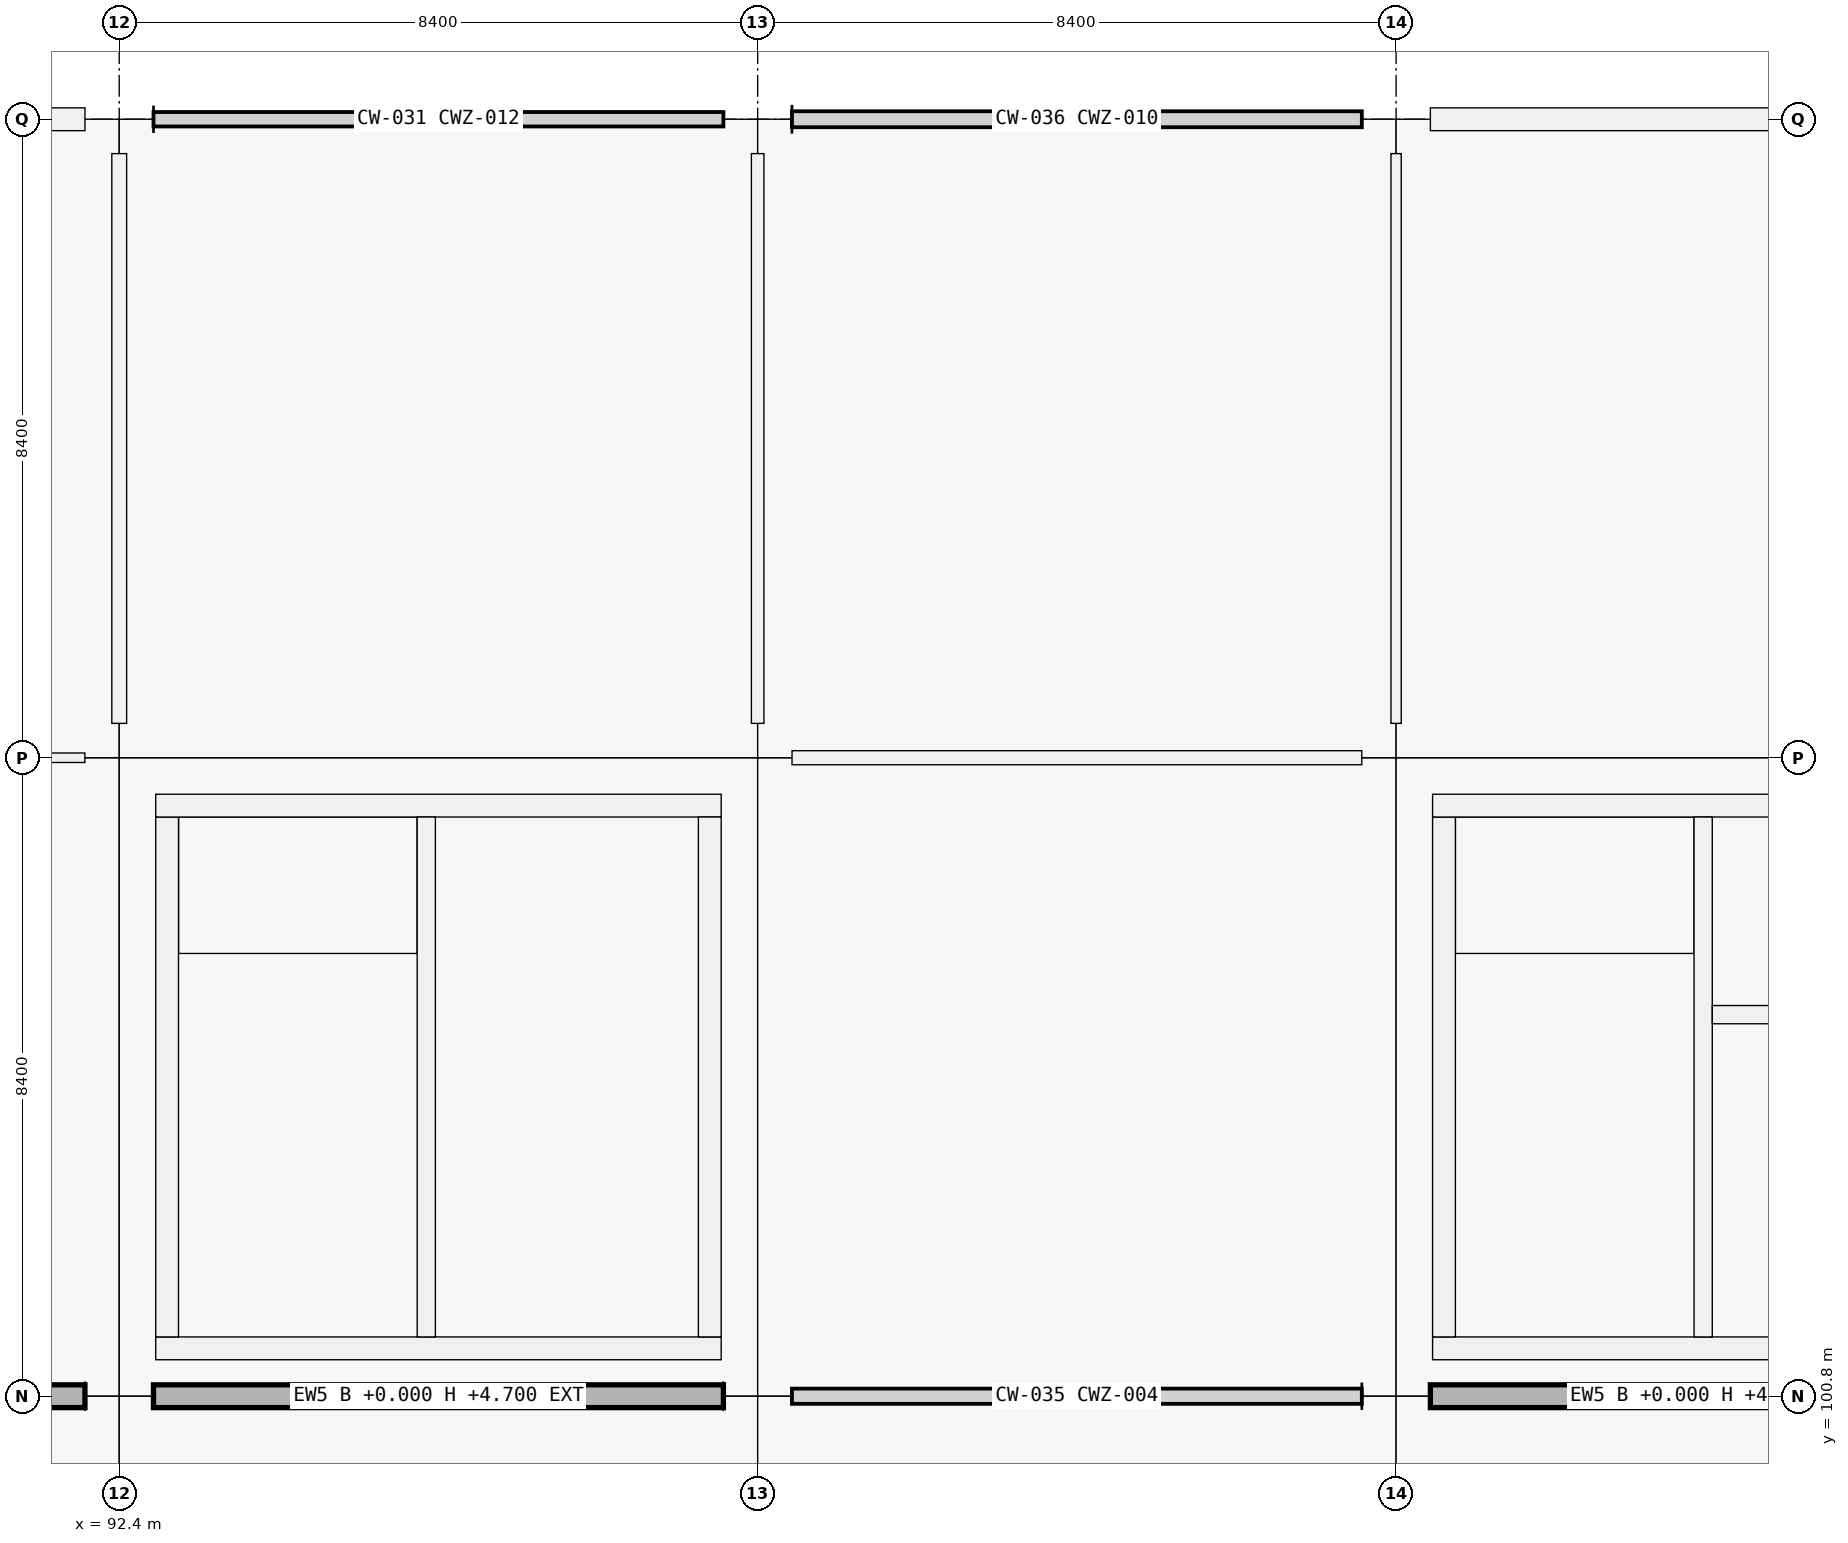
"""IFC4 building model, lengths in metres.
Left out: names, types, materials, properties, quantities, classifications, styles, units other than length and angle.
Written with IfcOpenShell. Run it as: python <this file> out.ifc"""

import sys

from ifc_helpers import new_model, si_unit, direction, frame, frame_2d, origin, origin_2d, place, context, subcontext, project, spatial, rectangle, extrude, element, fill, save


model = new_model("IFC4")
c1 = context("Model", 3, precision=1e-05, world=origin(), true_north=direction((0.0, 1.0)))
c2 = subcontext(c1, "Body", "Model", "MODEL_VIEW")
j1 = project(units=[si_unit("LENGTHUNIT", "METRE"), si_unit("PLANEANGLEUNIT", "RADIAN")], contexts=[c1])
p1 = place(None, origin())
s1 = spatial("IfcSite", under=j1, at=p1, CompositionType="ELEMENT")
p2 = place(p1, origin())
s2 = spatial("IfcBuilding", under=s1, at=p2, CompositionType="ELEMENT")
p3 = place(p2, origin())
s3 = spatial("IfcBuildingStorey", under=s2, at=p3, CompositionType="ELEMENT", Elevation=0.0)
for number, where, z_axis, x_axis in (
    (1, (92.4, 100.8, 0.0), (0.0, 0.0, 1.0), (1.0, 0.0, 0.0)),
    (2, (92.4, 109.2, 0.0), (0.0, 0.0, 1.0), (1.0, 0.0, 0.0)),
    (3, (92.4, 117.6, 0.0), (0.0, 0.0, 1.0), (1.0, 0.0, 0.0)),
    (4, (100.8, 100.8, 0.0), (0.0, 0.0, 1.0), (1.0, 0.0, 0.0)),
    (5, (100.8, 109.2, 0.0), (0.0, 0.0, 1.0), (1.0, 0.0, 0.0)),
    (6, (100.8, 117.6, 0.0), (0.0, 0.0, 1.0), (1.0, 0.0, 0.0)),
    (7, (109.2, 100.8, 0.0), (0.0, 0.0, 1.0), (1.0, 0.0, 0.0)),
    (8, (109.2, 109.2, 0.0), (0.0, 0.0, 1.0), (1.0, 0.0, 0.0)),
    (9, (109.2, 117.6, 0.0), (0.0, 0.0, 1.0), (1.0, 0.0, 0.0)),
):
    element("IfcColumn", number, at=place(p3, frame(where, z_axis=z_axis, x_axis=x_axis)), inside=s3, PredefinedType="COLUMN", context=c2, shape_type="SweptSolid", body=[
        extrude(rectangle(XDim=0.9, YDim=0.9, at=origin_2d()), origin(), (0.0, 0.0, 1.0), 5.76),
    ])
p4 = place(p3, frame((91.949, 100.8, 0.0), z_axis=(0.0, 0.0, 1.0), x_axis=(-1.0, 0.0, 0.0)))
e10 = element("IfcWall", 10, at=p4, inside=s3, PredefinedType="SOLIDWALL", context=c2, shape_type="SweptSolid", body=[
    extrude(rectangle(XDim=7.498, YDim=0.3, at=frame_2d((3.749, 0.0))), origin(), (0.0, 0.0, 1.0), 4.7),
])
p5 = place(p4, frame((2.899, 0.0, 0.9)))
e11 = element("IfcOpeningElement", 11, at=p5, cuts=e10, PredefinedType="OPENING", context=c2, shape_type="SweptSolid", body=[
    extrude(rectangle(XDim=1.7, YDim=1.85, at=frame_2d((0.85, 0.925))), frame((0.0, 0.15, 0.0), z_axis=(0.0, -1.0, 0.0), x_axis=(1.0, 0.0, 0.0)), (0.0, 0.0, 1.0), 0.3),
])
p6 = place(p3, frame((84.451, 117.6, 0.0), z_axis=(0.0, 0.0, 1.0), x_axis=(1.0, 0.0, 0.0)))
e12 = element("IfcWall", 12, at=p6, inside=s3, PredefinedType="SOLIDWALL", context=c2, shape_type="SweptSolid", body=[
    extrude(rectangle(XDim=7.498, YDim=0.3, at=frame_2d((3.749, 0.0))), origin(), (0.0, 0.0, 1.0), 4.7),
])
p7 = place(p6, frame((2.599, 0.0, 0.0)))
e13 = element("IfcOpeningElement", 13, at=p7, cuts=e12, PredefinedType="OPENING", context=c2, shape_type="SweptSolid", body=[
    extrude(rectangle(XDim=2.3, YDim=2.3, at=frame_2d((1.15, 1.15))), frame((0.0, 0.15, 0.0), z_axis=(0.0, -1.0, 0.0), x_axis=(1.0, 0.0, 0.0)), (0.0, 0.0, 1.0), 0.3),
])
for number, where, z_axis, x_axis in (
    (14, (100.349, 100.8, 0.0), (0.0, 0.0, 1.0), (-1.0, 0.0, 0.0)),
    (15, (117.149, 100.8, 0.0), (0.0, 0.0, 1.0), (-1.0, 0.0, 0.0)),
):
    element("IfcWall", number, at=place(p3, frame(where, z_axis=z_axis, x_axis=x_axis)), inside=s3, PredefinedType="SOLIDWALL", context=c2, shape_type="SweptSolid", body=[
        extrude(rectangle(XDim=7.498, YDim=0.3, at=frame_2d((3.749, 0.0))), origin(), (0.0, 0.0, 1.0), 4.7),
    ])
p8 = place(p3, frame((109.651, 117.6, 0.0), z_axis=(0.0, 0.0, 1.0), x_axis=(1.0, 0.0, 0.0)))
e16 = element("IfcWall", 16, at=p8, inside=s3, PredefinedType="SOLIDWALL", context=c2, shape_type="SweptSolid", body=[
    extrude(rectangle(XDim=7.498, YDim=0.3, at=frame_2d((3.749, 0.0))), origin(), (0.0, 0.0, 1.0), 4.7),
])
p9 = place(p8, frame((2.699, 0.0, 0.0)))
e17 = element("IfcOpeningElement", 17, at=p9, cuts=e16, PredefinedType="OPENING", context=c2, shape_type="SweptSolid", body=[
    extrude(rectangle(XDim=2.1, YDim=2.25, at=frame_2d((1.05, 1.125))), frame((0.0, 0.15, 0.0), z_axis=(0.0, -1.0, 0.0), x_axis=(1.0, 0.0, 0.0)), (0.0, 0.0, 1.0), 0.3),
])
p10 = place(p3, frame((117.12, 101.43, 0.0), z_axis=(0.0, 0.0, 1.0), x_axis=(-1.0, 0.0, 0.0)))
e18 = element("IfcWall", 18, at=p10, inside=s3, PredefinedType="SHEAR", context=c2, shape_type="SweptSolid", body=[
    extrude(rectangle(XDim=7.44, YDim=0.3, at=frame_2d((3.72, 0.0))), origin(), (0.0, 0.0, 1.0), 5.76),
])
p11 = place(p3, frame((109.83, 101.58, 0.0), z_axis=(0.0, 0.0, 1.0), x_axis=(0.0, 1.0, 0.0)))
e19 = element("IfcWall", 19, at=p11, inside=s3, PredefinedType="SHEAR", context=c2, shape_type="SweptSolid", body=[
    extrude(rectangle(XDim=6.84, YDim=0.3, at=frame_2d((3.42, 0.0))), origin(), (0.0, 0.0, 1.0), 5.76),
])
p12 = place(p3, frame((109.68, 108.57, 0.0), z_axis=(0.0, 0.0, 1.0), x_axis=(1.0, 0.0, 0.0)))
e20 = element("IfcWall", 20, at=p12, inside=s3, PredefinedType="SHEAR", context=c2, shape_type="SweptSolid", body=[
    extrude(rectangle(XDim=7.44, YDim=0.3, at=frame_2d((3.72, 0.0))), origin(), (0.0, 0.0, 1.0), 5.76),
])
p13 = place(p3, frame((113.24, 101.58, 0.0), z_axis=(0.0, 0.0, 1.0), x_axis=(0.0, 1.0, 0.0)))
e21 = element("IfcWall", 21, at=p13, inside=s3, PredefinedType="SHEAR", context=c2, shape_type="SweptSolid", body=[
    extrude(rectangle(XDim=6.84, YDim=0.24, at=frame_2d((3.42, 0.0))), origin(), (0.0, 0.0, 1.0), 5.76),
])
p14 = place(p13, frame((0.12, 0.0, 0.0)))
e22 = element("IfcOpeningElement", 22, at=p14, cuts=e21, PredefinedType="OPENING", context=c2, shape_type="SweptSolid", body=[
    extrude(rectangle(XDim=1.0, YDim=2.15, at=frame_2d((0.5, 1.075))), frame((0.0, 0.12, 0.0), z_axis=(0.0, -1.0, 0.0), x_axis=(1.0, 0.0, 0.0)), (0.0, 0.0, 1.0), 0.24),
])
p15 = place(p3, frame((113.36, 105.82, 0.0), z_axis=(0.0, 0.0, 1.0), x_axis=(1.0, 0.0, 0.0)))
e23 = element("IfcWall", 23, at=p15, inside=s3, PredefinedType="SHEAR", context=c2, shape_type="SweptSolid", body=[
    extrude(rectangle(XDim=3.46, YDim=0.24, at=frame_2d((1.73, 0.0))), origin(), (0.0, 0.0, 1.0), 5.76),
])
p16 = place(p15, frame((1.13, 0.0, 0.0)))
e24 = element("IfcOpeningElement", 24, at=p16, cuts=e23, PredefinedType="OPENING", context=c2, shape_type="SweptSolid", body=[
    extrude(rectangle(XDim=1.2, YDim=2.2, at=frame_2d((0.6, 1.1))), frame((0.0, 0.12, 0.0), z_axis=(0.0, -1.0, 0.0), x_axis=(1.0, 0.0, 0.0)), (0.0, 0.0, 1.0), 0.24),
])
p17 = place(p3, frame((100.32, 101.43, 0.0), z_axis=(0.0, 0.0, 1.0), x_axis=(-1.0, 0.0, 0.0)))
e25 = element("IfcWall", 25, at=p17, inside=s3, PredefinedType="SHEAR", context=c2, shape_type="SweptSolid", body=[
    extrude(rectangle(XDim=7.44, YDim=0.3, at=frame_2d((3.72, 0.0))), origin(), (0.0, 0.0, 1.0), 5.76),
])
p18 = place(p3, frame((93.03, 101.58, 0.0), z_axis=(0.0, 0.0, 1.0), x_axis=(0.0, 1.0, 0.0)))
e26 = element("IfcWall", 26, at=p18, inside=s3, PredefinedType="SHEAR", context=c2, shape_type="SweptSolid", body=[
    extrude(rectangle(XDim=6.84, YDim=0.3, at=frame_2d((3.42, 0.0))), origin(), (0.0, 0.0, 1.0), 5.76),
])
p19 = place(p3, frame((92.88, 108.57, 0.0), z_axis=(0.0, 0.0, 1.0), x_axis=(1.0, 0.0, 0.0)))
e27 = element("IfcWall", 27, at=p19, inside=s3, PredefinedType="SHEAR", context=c2, shape_type="SweptSolid", body=[
    extrude(rectangle(XDim=7.44, YDim=0.3, at=frame_2d((3.72, 0.0))), origin(), (0.0, 0.0, 1.0), 5.76),
])
p20 = place(p3, frame((100.17, 108.42, 0.0), z_axis=(0.0, 0.0, 1.0), x_axis=(0.0, -1.0, 0.0)))
e28 = element("IfcWall", 28, at=p20, inside=s3, PredefinedType="SHEAR", context=c2, shape_type="SweptSolid", body=[
    extrude(rectangle(XDim=6.84, YDim=0.3, at=frame_2d((3.42, 0.0))), origin(), (0.0, 0.0, 1.0), 5.76),
])
p21 = place(p20, frame((3.97, 0.0, 0.0)))
e29 = element("IfcOpeningElement", 29, at=p21, cuts=e28, PredefinedType="OPENING", context=c2, shape_type="SweptSolid", body=[
    extrude(rectangle(XDim=1.5, YDim=2.15, at=frame_2d((0.75, 1.075))), frame((0.0, 0.15, 0.0), z_axis=(0.0, -1.0, 0.0), x_axis=(1.0, 0.0, 0.0)), (0.0, 0.0, 1.0), 0.3),
])
p22 = place(p3, frame((96.44, 101.58, 0.0), z_axis=(0.0, 0.0, 1.0), x_axis=(0.0, 1.0, 0.0)))
e30 = element("IfcWall", 30, at=p22, inside=s3, PredefinedType="SHEAR", context=c2, shape_type="SweptSolid", body=[
    extrude(rectangle(XDim=6.84, YDim=0.24, at=frame_2d((3.42, 0.0))), origin(), (0.0, 0.0, 1.0), 5.76),
])
p23 = place(p22, frame((0.12, 0.0, 0.0)))
e31 = element("IfcOpeningElement", 31, at=p23, cuts=e30, PredefinedType="OPENING", context=c2, shape_type="SweptSolid", body=[
    extrude(rectangle(XDim=1.0, YDim=2.15, at=frame_2d((0.5, 1.075))), frame((0.0, 0.12, 0.0), z_axis=(0.0, -1.0, 0.0), x_axis=(1.0, 0.0, 0.0)), (0.0, 0.0, 1.0), 0.24),
])
p24 = place(p3, frame((84.452, 109.2, 0.0), z_axis=(0.0, 0.0, 1.0), x_axis=(1.0, 0.0, 0.0)))
e32 = element("IfcWall", 32, at=p24, inside=s3, PredefinedType="PARTITIONING", context=c2, shape_type="SweptSolid", body=[
    extrude(rectangle(XDim=7.496, YDim=0.125, at=frame_2d((3.748, 0.0))), origin(), (0.0, 0.0, 1.0), 3.66),
])
p25 = place(p24, frame((3.218, 0.0, 0.0)))
e33 = element("IfcOpeningElement", 33, at=p25, cuts=e32, PredefinedType="OPENING", context=c2, shape_type="SweptSolid", body=[
    extrude(rectangle(XDim=1.06, YDim=2.25, at=frame_2d((0.53, 1.125))), frame((0.0, 0.062, 0.0), z_axis=(0.0, -1.0, 0.0), x_axis=(1.0, 0.0, 0.0)), (0.0, 0.0, 1.0), 0.125),
])
p26 = place(p3, frame((101.252, 109.2, 0.0), z_axis=(0.0, 0.0, 1.0), x_axis=(1.0, 0.0, 0.0)))
e34 = element("IfcWall", 34, at=p26, inside=s3, PredefinedType="PARTITIONING", context=c2, shape_type="SweptSolid", body=[
    extrude(rectangle(XDim=7.496, YDim=0.185, at=frame_2d((3.748, 0.0))), origin(), (0.0, 0.0, 1.0), 3.66),
])
p27 = place(p26, frame((3.278, 0.0, 0.0)))
e35 = element("IfcOpeningElement", 35, at=p27, cuts=e34, PredefinedType="OPENING", context=c2, shape_type="SweptSolid", body=[
    extrude(rectangle(XDim=0.94, YDim=2.15, at=frame_2d((0.47, 1.075))), frame((0.0, 0.093, 0.0), z_axis=(0.0, -1.0, 0.0), x_axis=(1.0, 0.0, 0.0)), (0.0, 0.0, 1.0), 0.185),
])
p28 = place(p3, frame((92.4, 109.652, 0.0), z_axis=(0.0, 0.0, 1.0), x_axis=(0.0, 1.0, 0.0)))
e36 = element("IfcWall", 36, at=p28, inside=s3, PredefinedType="PARTITIONING", context=c2, shape_type="SweptSolid", body=[
    extrude(rectangle(XDim=7.496, YDim=0.195, at=frame_2d((3.748, 0.0))), origin(), (0.0, 0.0, 1.0), 3.66),
])
p29 = place(p28, frame((3.223, 0.0, 0.0)))
e37 = element("IfcOpeningElement", 37, at=p29, cuts=e36, PredefinedType="OPENING", context=c2, shape_type="SweptSolid", body=[
    extrude(rectangle(XDim=1.05, YDim=2.12, at=frame_2d((0.525, 1.06))), frame((0.0, 0.098, 0.0), z_axis=(0.0, -1.0, 0.0), x_axis=(1.0, 0.0, 0.0)), (0.0, 0.0, 1.0), 0.195),
])
p30 = place(p3, frame((100.8, 109.652, 0.0), z_axis=(0.0, 0.0, 1.0), x_axis=(0.0, 1.0, 0.0)))
e38 = element("IfcWall", 38, at=p30, inside=s3, PredefinedType="PARTITIONING", context=c2, shape_type="SweptSolid", body=[
    extrude(rectangle(XDim=7.496, YDim=0.165, at=frame_2d((3.748, 0.0))), origin(), (0.0, 0.0, 1.0), 3.66),
])
p31 = place(p30, frame((3.208, 0.0, 0.0)))
e39 = element("IfcOpeningElement", 39, at=p31, cuts=e38, PredefinedType="OPENING", context=c2, shape_type="SweptSolid", body=[
    extrude(rectangle(XDim=1.08, YDim=2.25, at=frame_2d((0.54, 1.125))), frame((0.0, 0.083, 0.0), z_axis=(0.0, -1.0, 0.0), x_axis=(1.0, 0.0, 0.0)), (0.0, 0.0, 1.0), 0.165),
])
p32 = place(p3, frame((109.2, 109.652, 0.0), z_axis=(0.0, 0.0, 1.0), x_axis=(0.0, 1.0, 0.0)))
e40 = element("IfcWall", 40, at=p32, inside=s3, PredefinedType="PARTITIONING", context=c2, shape_type="SweptSolid", body=[
    extrude(rectangle(XDim=7.496, YDim=0.135, at=frame_2d((3.748, 0.0))), origin(), (0.0, 0.0, 1.0), 3.66),
])
p33 = place(p32, frame((3.243, 0.0, 0.0)))
e41 = element("IfcOpeningElement", 41, at=p33, cuts=e40, PredefinedType="OPENING", context=c2, shape_type="SweptSolid", body=[
    extrude(rectangle(XDim=1.01, YDim=2.12, at=frame_2d((0.505, 1.06))), frame((0.0, 0.067, 0.0), z_axis=(0.0, -1.0, 0.0), x_axis=(1.0, 0.0, 0.0)), (0.0, 0.0, 1.0), 0.135),
])
p34 = place(p9, origin())
e42 = element("IfcDoor", 42, at=p34, inside=s3, OperationType="DOUBLE_DOOR_SINGLE_SWING", PredefinedType="DOOR", context=c2, shape_type="SweptSolid", body=[
    extrude(rectangle(XDim=2.1, YDim=2.25, at=frame_2d((1.05, 1.125))), frame((0.0, 0.025, 0.0), z_axis=(0.0, -1.0, 0.0), x_axis=(1.0, 0.0, 0.0)), (0.0, 0.0, 1.0), 0.05),
])
fill(e17, e42)
p35 = place(p14, origin())
e43 = element("IfcDoor", 43, at=p35, inside=s3, OperationType="SINGLE_SWING_LEFT", PredefinedType="DOOR", context=c2, shape_type="SweptSolid", body=[
    extrude(rectangle(XDim=1.0, YDim=2.15, at=frame_2d((0.5, 1.075))), frame((0.0, 0.025, 0.0), z_axis=(0.0, -1.0, 0.0), x_axis=(1.0, 0.0, 0.0)), (0.0, 0.0, 1.0), 0.05),
])
fill(e22, e43)
p36 = place(p23, origin())
e44 = element("IfcDoor", 44, at=p36, inside=s3, OperationType="SINGLE_SWING_LEFT", PredefinedType="DOOR", context=c2, shape_type="SweptSolid", body=[
    extrude(rectangle(XDim=1.0, YDim=2.15, at=frame_2d((0.5, 1.075))), frame((0.0, 0.025, 0.0), z_axis=(0.0, -1.0, 0.0), x_axis=(1.0, 0.0, 0.0)), (0.0, 0.0, 1.0), 0.05),
])
fill(e31, e44)
p37 = place(p21, origin())
e45 = element("IfcDoor", 45, at=p37, inside=s3, OperationType="DOUBLE_DOOR_SINGLE_SWING", PredefinedType="DOOR", context=c2, shape_type="SweptSolid", body=[
    extrude(rectangle(XDim=1.5, YDim=2.15, at=frame_2d((0.75, 1.075))), frame((0.0, 0.025, 0.0), z_axis=(0.0, -1.0, 0.0), x_axis=(1.0, 0.0, 0.0)), (0.0, 0.0, 1.0), 0.05),
])
fill(e29, e45)
p38 = place(p27, origin())
e46 = element("IfcDoor", 46, at=p38, inside=s3, OperationType="SINGLE_SWING_RIGHT", PredefinedType="DOOR", context=c2, shape_type="SweptSolid", body=[
    extrude(rectangle(XDim=0.94, YDim=2.15, at=frame_2d((0.47, 1.075))), frame((0.0, 0.025, 0.0), z_axis=(0.0, -1.0, 0.0), x_axis=(1.0, 0.0, 0.0)), (0.0, 0.0, 1.0), 0.05),
])
fill(e35, e46)
p39 = place(p29, origin())
e47 = element("IfcDoor", 47, at=p39, inside=s3, OperationType="SINGLE_SWING_RIGHT", PredefinedType="DOOR", context=c2, shape_type="SweptSolid", body=[
    extrude(rectangle(XDim=1.05, YDim=2.12, at=frame_2d((0.525, 1.06))), frame((0.0, 0.025, 0.0), z_axis=(0.0, -1.0, 0.0), x_axis=(1.0, 0.0, 0.0)), (0.0, 0.0, 1.0), 0.05),
])
fill(e37, e47)
p40 = place(p33, origin())
e48 = element("IfcDoor", 48, at=p40, inside=s3, OperationType="SINGLE_SWING_LEFT", PredefinedType="DOOR", context=c2, shape_type="SweptSolid", body=[
    extrude(rectangle(XDim=1.01, YDim=2.12, at=frame_2d((0.505, 1.06))), frame((0.0, 0.025, 0.0), z_axis=(0.0, -1.0, 0.0), x_axis=(1.0, 0.0, 0.0)), (0.0, 0.0, 1.0), 0.05),
])
fill(e41, e48)
p41 = place(p31, origin())
e49 = element("IfcDoor", 49, at=p41, inside=s3, OperationType="SINGLE_SWING_RIGHT", PredefinedType="DOOR", context=c2, shape_type="SweptSolid", body=[
    extrude(rectangle(XDim=1.08, YDim=2.25, at=frame_2d((0.54, 1.125))), frame((0.0, 0.025, 0.0), z_axis=(0.0, -1.0, 0.0), x_axis=(1.0, 0.0, 0.0)), (0.0, 0.0, 1.0), 0.05),
])
fill(e39, e49)
save(model, sys.argv[1])
